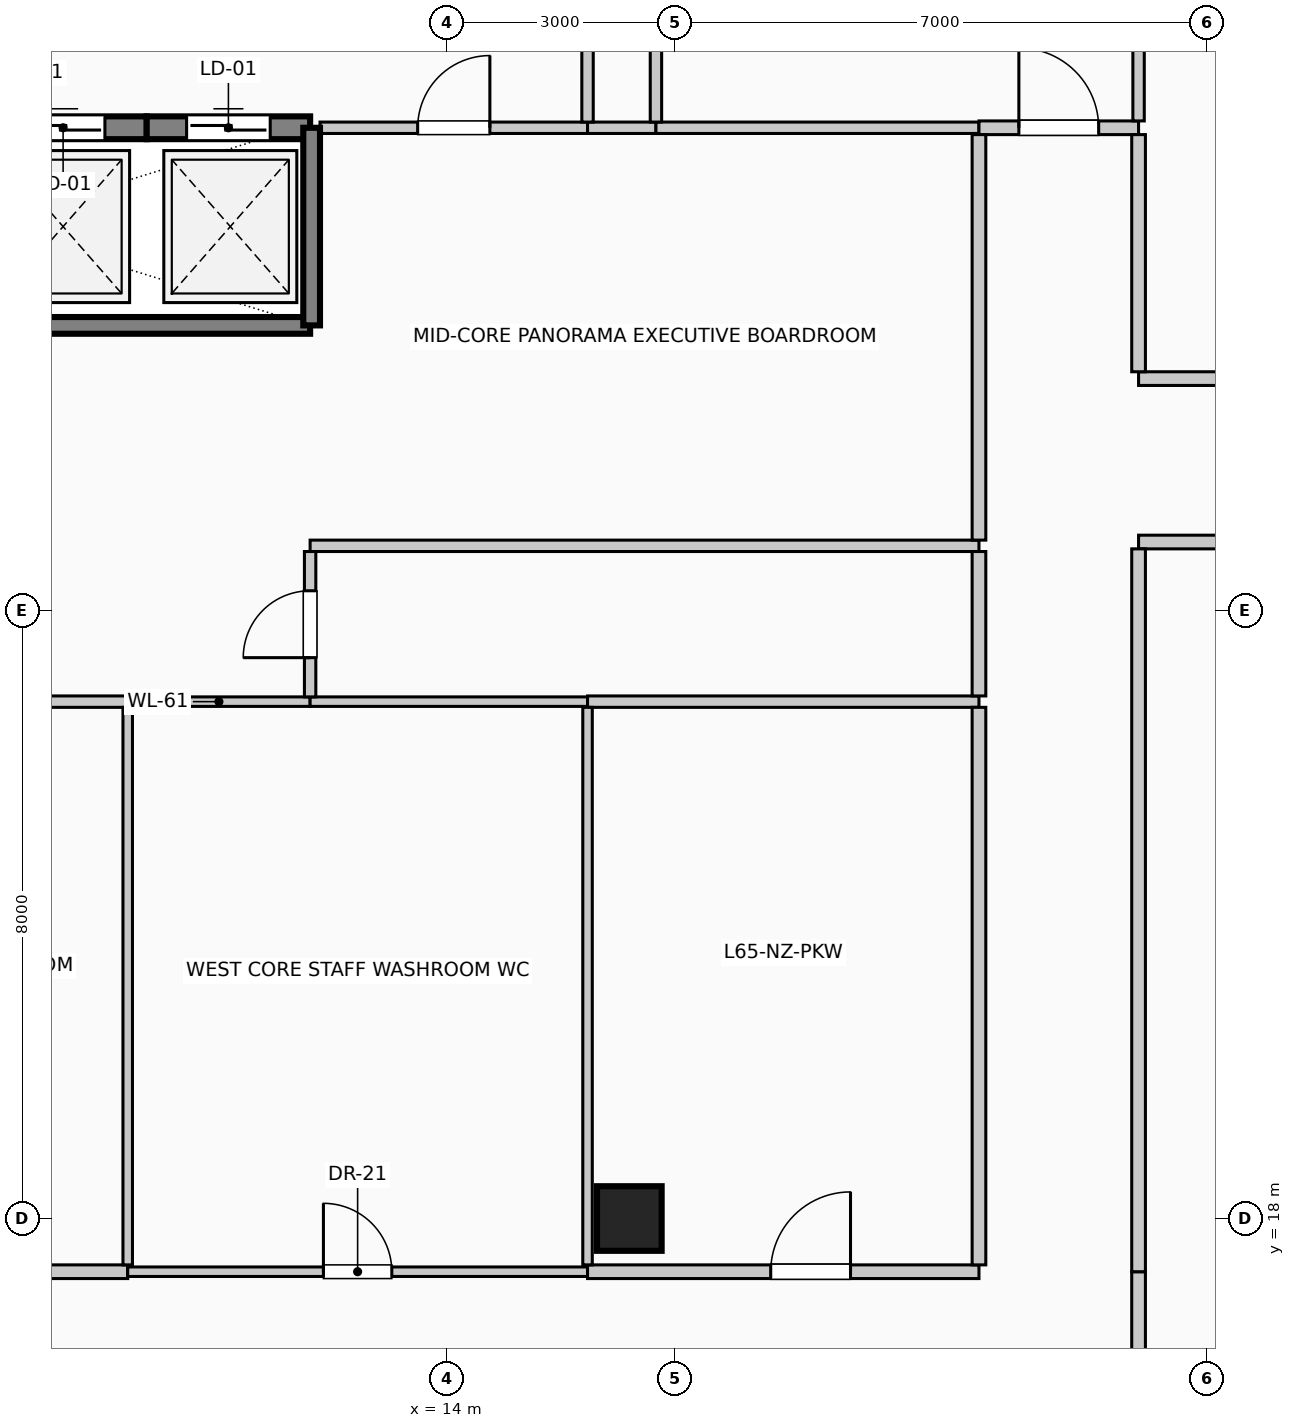
"""IFC4 building model, lengths in metres.
Left out: names, types, materials, properties, quantities, classifications, styles, units other than length and angle.
Written with IfcOpenShell. Run it as: python <this file> out.ifc"""

import sys

from ifc_helpers import new_model, si_unit, direction, frame, frame_2d, origin, origin_2d, place, context, subcontext, project, spatial, rectangle, circle, extrude, element, fill, save


model = new_model("IFC4")
c1 = context("Model", 3, precision=1e-05, world=origin(), true_north=direction((0.0, 1.0)))
c2 = subcontext(c1, "Body", "Model", "MODEL_VIEW")
j1 = project(units=[si_unit("LENGTHUNIT", "METRE"), si_unit("PLANEANGLEUNIT", "RADIAN")], contexts=[c1])
p1 = place(None, origin())
s1 = spatial("IfcSite", under=j1, at=p1, CompositionType="ELEMENT")
p2 = place(p1, origin())
s2 = spatial("IfcBuilding", under=s1, at=p2, CompositionType="ELEMENT")
p3 = place(p2, frame((0.0, 0.0, 268.6)))
s3 = spatial("IfcBuildingStorey", under=s2, at=p3, CompositionType="ELEMENT", Elevation=268.6)
p4 = place(p3, frame((16.4, 18.0, 0.0), z_axis=(0.0, 0.0, 1.0), x_axis=(1.0, 0.0, 0.0)))
e1 = element("IfcColumn", 1, at=p4, inside=s3, PredefinedType="COLUMN", context=c2, shape_type="SweptSolid", body=[
    extrude(circle(Radius=0.425, at=origin_2d()), origin(), (0.0, 0.0, 1.0), 4.0),
])
p5 = place(p3, frame((7.85, 32.35, 0.0), z_axis=(0.0, 0.0, 1.0), x_axis=(1.0, 0.0, 0.0)))
e2 = element("IfcWall", 2, at=p5, inside=s3, PredefinedType="SOLIDWALL", context=c2, shape_type="SweptSolid", body=[
    extrude(rectangle(XDim=2.2, YDim=0.3, at=frame_2d((1.1, 0.0))), origin(), (0.0, 0.0, 1.0), 4.0),
])
p6 = place(p5, frame((0.55, 0.0, 0.0)))
e3 = element("IfcOpeningElement", 3, at=p6, cuts=e2, PredefinedType="OPENING", context=c2, shape_type="SweptSolid", body=[
    extrude(rectangle(XDim=1.1, YDim=2.2, at=frame_2d((0.55, 1.1))), frame((0.0, 0.16, 0.0), z_axis=(0.0, -1.0, 0.0), x_axis=(1.0, 0.0, 0.0)), (0.0, 0.0, 1.0), 0.32),
])
p7 = place(p3, frame((10.05, 32.35, 0.0), z_axis=(0.0, 0.0, 1.0), x_axis=(1.0, 0.0, 0.0)))
e4 = element("IfcWall", 4, at=p7, inside=s3, PredefinedType="SOLIDWALL", context=c2, shape_type="SweptSolid", body=[
    extrude(rectangle(XDim=2.15, YDim=0.3, at=frame_2d((1.075, 0.0))), origin(), (0.0, 0.0, 1.0), 4.0),
])
p8 = place(p7, frame((0.525, 0.0, 0.0)))
e5 = element("IfcOpeningElement", 5, at=p8, cuts=e4, PredefinedType="OPENING", context=c2, shape_type="SweptSolid", body=[
    extrude(rectangle(XDim=1.1, YDim=2.2, at=frame_2d((0.55, 1.1))), frame((0.0, 0.16, 0.0), z_axis=(0.0, -1.0, 0.0), x_axis=(1.0, 0.0, 0.0)), (0.0, 0.0, 1.0), 0.32),
])
p9 = place(p3, frame((3.55, 29.75, 0.0), z_axis=(0.0, 0.0, 1.0), x_axis=(1.0, 0.0, 0.0)))
e6 = element("IfcWall", 6, at=p9, inside=s3, PredefinedType="SOLIDWALL", context=c2, shape_type="SweptSolid", body=[
    extrude(rectangle(XDim=8.65, YDim=0.22, at=frame_2d((4.325, 0.0))), origin(), (0.0, 0.0, 1.0), 4.0),
])
p10 = place(p3, frame((12.22, 29.75, 0.0), z_axis=(0.0, 0.0, 1.0), x_axis=(0.0, 1.0, 0.0)))
e7 = element("IfcWall", 7, at=p10, inside=s3, PredefinedType="SOLIDWALL", context=c2, shape_type="SweptSolid", body=[
    extrude(rectangle(XDim=2.6, YDim=0.22, at=frame_2d((1.3, 0.0))), origin(), (0.0, 0.0, 1.0), 4.0),
])
p11 = place(p3, frame((3.55, 17.3, 0.0), z_axis=(0.0, 0.0, 1.0), x_axis=(1.0, 0.0, 0.0)))
e8 = element("IfcWall", 8, at=p11, inside=s3, PredefinedType="PARTITIONING", context=c2, shape_type="SweptSolid", body=[
    extrude(rectangle(XDim=6.25, YDim=0.18, at=frame_2d((3.125, 0.0))), origin(), (0.0, 0.0, 1.0), 3.75),
])
p12 = place(p11, frame((2.6, 0.0, 0.0)))
e9 = element("IfcOpeningElement", 9, at=p12, cuts=e8, PredefinedType="OPENING", context=c2, shape_type="SweptSolid", body=[
    extrude(rectangle(XDim=1.05, YDim=2.15, at=frame_2d((0.525, 1.075))), frame((0.0, 0.1, 0.0), z_axis=(0.0, -1.0, 0.0), x_axis=(1.0, 0.0, 0.0)), (0.0, 0.0, 1.0), 0.2),
])
p13 = place(p3, frame((9.8, 17.3, 0.0), z_axis=(0.0, 0.0, 1.0), x_axis=(1.0, 0.0, 0.0)))
e10 = element("IfcWall", 10, at=p13, inside=s3, PredefinedType="PARTITIONING", context=c2, shape_type="SweptSolid", body=[
    extrude(rectangle(XDim=6.05, YDim=0.125, at=frame_2d((3.025, 0.0))), origin(), (0.0, 0.0, 1.0), 3.75),
])
p14 = place(p13, frame((2.575, 0.0, 0.0)))
e11 = element("IfcOpeningElement", 11, at=p14, cuts=e10, PredefinedType="OPENING", context=c2, shape_type="SweptSolid", body=[
    extrude(rectangle(XDim=0.9, YDim=2.1, at=frame_2d((0.45, 1.05))), frame((0.0, 0.073, 0.0), z_axis=(0.0, -1.0, 0.0), x_axis=(1.0, 0.0, 0.0)), (0.0, 0.0, 1.0), 0.145),
])
p15 = place(p3, frame((15.85, 17.3, 0.0), z_axis=(0.0, 0.0, 1.0), x_axis=(1.0, 0.0, 0.0)))
e12 = element("IfcWall", 12, at=p15, inside=s3, PredefinedType="PARTITIONING", context=c2, shape_type="SweptSolid", body=[
    extrude(rectangle(XDim=5.15, YDim=0.18, at=frame_2d((2.575, 0.0))), origin(), (0.0, 0.0, 1.0), 3.75),
])
p16 = place(p15, frame((2.41, 0.0, 0.0)))
e13 = element("IfcOpeningElement", 13, at=p16, cuts=e12, PredefinedType="OPENING", context=c2, shape_type="SweptSolid", body=[
    extrude(rectangle(XDim=1.05, YDim=2.15, at=frame_2d((0.525, 1.075))), frame((0.0, 0.1, 0.0), z_axis=(0.0, -1.0, 0.0), x_axis=(1.0, 0.0, 0.0)), (0.0, 0.0, 1.0), 0.2),
])
p17 = place(p3, frame((3.55, 24.8, 0.0), z_axis=(0.0, 0.0, 1.0), x_axis=(1.0, 0.0, 0.0)))
e14 = element("IfcWall", 14, at=p17, inside=s3, PredefinedType="PARTITIONING", context=c2, shape_type="SweptSolid", body=[
    extrude(rectangle(XDim=6.25, YDim=0.15, at=frame_2d((3.125, 0.0))), origin(), (0.0, 0.0, 1.0), 3.75),
])
p18 = place(p3, frame((9.8, 24.8, 0.0), z_axis=(0.0, 0.0, 1.0), x_axis=(1.0, 0.0, 0.0)))
e15 = element("IfcWall", 15, at=p18, inside=s3, PredefinedType="PARTITIONING", context=c2, shape_type="SweptSolid", body=[
    extrude(rectangle(XDim=2.4, YDim=0.125, at=frame_2d((1.2, 0.0))), origin(), (0.0, 0.0, 1.0), 3.75),
])
p19 = place(p3, frame((12.2, 24.8, 0.0), z_axis=(0.0, 0.0, 1.0), x_axis=(1.0, 0.0, 0.0)))
e16 = element("IfcWall", 16, at=p19, inside=s3, PredefinedType="PARTITIONING", context=c2, shape_type="SweptSolid", body=[
    extrude(rectangle(XDim=3.65, YDim=0.125, at=frame_2d((1.825, 0.0))), origin(), (0.0, 0.0, 1.0), 3.75),
])
p20 = place(p3, frame((15.85, 24.8, 0.0), z_axis=(0.0, 0.0, 1.0), x_axis=(1.0, 0.0, 0.0)))
e17 = element("IfcWall", 17, at=p20, inside=s3, PredefinedType="PARTITIONING", context=c2, shape_type="SweptSolid", body=[
    extrude(rectangle(XDim=5.15, YDim=0.15, at=frame_2d((2.575, 0.0))), origin(), (0.0, 0.0, 1.0), 3.75),
])
p21 = place(p3, frame((12.2, 26.85, 0.0), z_axis=(0.0, 0.0, 1.0), x_axis=(1.0, 0.0, 0.0)))
e18 = element("IfcWall", 18, at=p21, inside=s3, PredefinedType="PARTITIONING", context=c2, shape_type="SweptSolid", body=[
    extrude(rectangle(XDim=8.8, YDim=0.15, at=frame_2d((4.4, 0.0))), origin(), (0.0, 0.0, 1.0), 3.75),
])
p22 = place(p3, frame((23.1, 26.9, 0.0), z_axis=(0.0, 0.0, 1.0), x_axis=(1.0, 0.0, 0.0)))
e19 = element("IfcWall", 19, at=p22, inside=s3, PredefinedType="PARTITIONING", context=c2, shape_type="SweptSolid", body=[
    extrude(rectangle(XDim=4.12, YDim=0.18, at=frame_2d((2.06, 0.0))), origin(), (0.0, 0.0, 1.0), 3.75),
])
p23 = place(p22, frame((1.535, 0.0, 0.0)))
e20 = element("IfcOpeningElement", 20, at=p23, cuts=e19, PredefinedType="OPENING", context=c2, shape_type="SweptSolid", body=[
    extrude(rectangle(XDim=1.05, YDim=2.15, at=frame_2d((0.525, 1.075))), frame((0.0, 0.1, 0.0), z_axis=(0.0, -1.0, 0.0), x_axis=(1.0, 0.0, 0.0)), (0.0, 0.0, 1.0), 0.2),
])
p24 = place(p3, frame((23.1, 29.05, 0.0), z_axis=(0.0, 0.0, 1.0), x_axis=(1.0, 0.0, 0.0)))
e21 = element("IfcWall", 21, at=p24, inside=s3, PredefinedType="PARTITIONING", context=c2, shape_type="SweptSolid", body=[
    extrude(rectangle(XDim=7.13, YDim=0.18, at=frame_2d((3.565, 0.0))), origin(), (0.0, 0.0, 1.0), 3.75),
])
p25 = place(p24, frame((3.09, 0.0, 0.0)))
e22 = element("IfcOpeningElement", 22, at=p25, cuts=e21, PredefinedType="OPENING", context=c2, shape_type="SweptSolid", body=[
    extrude(rectangle(XDim=0.95, YDim=2.15, at=frame_2d((0.475, 1.075))), frame((0.0, 0.1, 0.0), z_axis=(0.0, -1.0, 0.0), x_axis=(1.0, 0.0, 0.0)), (0.0, 0.0, 1.0), 0.2),
])
p26 = place(p3, frame((12.33, 32.35, 0.0), z_axis=(0.0, 0.0, 1.0), x_axis=(1.0, 0.0, 0.0)))
e23 = element("IfcWall", 23, at=p26, inside=s3, PredefinedType="PARTITIONING", context=c2, shape_type="SweptSolid", body=[
    extrude(rectangle(XDim=3.52, YDim=0.15, at=frame_2d((1.76, 0.0))), origin(), (0.0, 0.0, 1.0), 3.75),
])
p27 = place(p26, frame((1.285, 0.0, 0.0)))
e24 = element("IfcOpeningElement", 24, at=p27, cuts=e23, PredefinedType="OPENING", context=c2, shape_type="SweptSolid", body=[
    extrude(rectangle(XDim=0.95, YDim=2.15, at=frame_2d((0.475, 1.075))), frame((0.0, 0.085, 0.0), z_axis=(0.0, -1.0, 0.0), x_axis=(1.0, 0.0, 0.0)), (0.0, 0.0, 1.0), 0.17),
])
p28 = place(p3, frame((15.85, 32.35, 0.0), z_axis=(0.0, 0.0, 1.0), x_axis=(1.0, 0.0, 0.0)))
e25 = element("IfcWall", 25, at=p28, inside=s3, PredefinedType="PARTITIONING", context=c2, shape_type="SweptSolid", body=[
    extrude(rectangle(XDim=0.9, YDim=0.15, at=frame_2d((0.45, 0.0))), origin(), (0.0, 0.0, 1.0), 3.75),
])
p29 = place(p3, frame((16.75, 32.35, 0.0), z_axis=(0.0, 0.0, 1.0), x_axis=(1.0, 0.0, 0.0)))
e26 = element("IfcWall", 26, at=p29, inside=s3, PredefinedType="PARTITIONING", context=c2, shape_type="SweptSolid", body=[
    extrude(rectangle(XDim=4.25, YDim=0.15, at=frame_2d((2.125, 0.0))), origin(), (0.0, 0.0, 1.0), 3.75),
])
p30 = place(p3, frame((21.0, 32.35, 0.0), z_axis=(0.0, 0.0, 1.0), x_axis=(1.0, 0.0, 0.0)))
e27 = element("IfcWall", 27, at=p30, inside=s3, PredefinedType="PARTITIONING", context=c2, shape_type="SweptSolid", body=[
    extrude(rectangle(XDim=2.1, YDim=0.18, at=frame_2d((1.05, 0.0))), origin(), (0.0, 0.0, 1.0), 3.75),
])
p31 = place(p30, frame((0.525, 0.0, 0.0)))
e28 = element("IfcOpeningElement", 28, at=p31, cuts=e27, PredefinedType="OPENING", context=c2, shape_type="SweptSolid", body=[
    extrude(rectangle(XDim=1.05, YDim=2.15, at=frame_2d((0.525, 1.075))), frame((0.0, 0.1, 0.0), z_axis=(0.0, -1.0, 0.0), x_axis=(1.0, 0.0, 0.0)), (0.0, 0.0, 1.0), 0.2),
])
p32 = place(p3, frame((9.8, 17.39, 0.0), z_axis=(0.0, 0.0, 1.0), x_axis=(0.0, 1.0, 0.0)))
e29 = element("IfcWall", 29, at=p32, inside=s3, PredefinedType="PARTITIONING", context=c2, shape_type="SweptSolid", body=[
    extrude(rectangle(XDim=7.335, YDim=0.125, at=frame_2d((3.667, 0.0))), origin(), (0.0, 0.0, 1.0), 3.75),
])
p33 = place(p3, frame((12.2, 24.863, 0.0), z_axis=(0.0, 0.0, 1.0), x_axis=(0.0, 1.0, 0.0)))
e30 = element("IfcWall", 30, at=p33, inside=s3, PredefinedType="PARTITIONING", context=c2, shape_type="SweptSolid", body=[
    extrude(rectangle(XDim=1.912, YDim=0.15, at=frame_2d((0.956, 0.0))), origin(), (0.0, 0.0, 1.0), 3.75),
])
p34 = place(p33, frame((0.516, 0.0, 0.0)))
e31 = element("IfcOpeningElement", 31, at=p34, cuts=e30, PredefinedType="OPENING", context=c2, shape_type="SweptSolid", body=[
    extrude(rectangle(XDim=0.88, YDim=2.1, at=frame_2d((0.44, 1.05))), frame((0.0, 0.085, 0.0), z_axis=(0.0, -1.0, 0.0), x_axis=(1.0, 0.0, 0.0)), (0.0, 0.0, 1.0), 0.17),
])
p35 = place(p3, frame((15.85, 17.39, 0.0), z_axis=(0.0, 0.0, 1.0), x_axis=(0.0, 1.0, 0.0)))
e32 = element("IfcWall", 32, at=p35, inside=s3, PredefinedType="PARTITIONING", context=c2, shape_type="SweptSolid", body=[
    extrude(rectangle(XDim=7.335, YDim=0.125, at=frame_2d((3.667, 0.0))), origin(), (0.0, 0.0, 1.0), 3.75),
])
p36 = place(p3, frame((15.85, 32.425, 0.0), z_axis=(0.0, 0.0, 1.0), x_axis=(0.0, 1.0, 0.0)))
e33 = element("IfcWall", 33, at=p36, inside=s3, PredefinedType="PARTITIONING", context=c2, shape_type="SweptSolid", body=[
    extrude(rectangle(XDim=1.725, YDim=0.15, at=frame_2d((0.862, 0.0))), origin(), (0.0, 0.0, 1.0), 3.75),
])
p37 = place(p3, frame((16.75, 32.425, 0.0), z_axis=(0.0, 0.0, 1.0), x_axis=(0.0, 1.0, 0.0)))
e34 = element("IfcWall", 34, at=p37, inside=s3, PredefinedType="PARTITIONING", context=c2, shape_type="SweptSolid", body=[
    extrude(rectangle(XDim=1.15, YDim=0.15, at=frame_2d((0.575, 0.0))), origin(), (0.0, 0.0, 1.0), 3.75),
])
p38 = place(p3, frame((21.0, 17.39, 0.0), z_axis=(0.0, 0.0, 1.0), x_axis=(0.0, 1.0, 0.0)))
e35 = element("IfcWall", 35, at=p38, inside=s3, PredefinedType="PARTITIONING", context=c2, shape_type="SweptSolid", body=[
    extrude(rectangle(XDim=7.335, YDim=0.18, at=frame_2d((3.667, 0.0))), origin(), (0.0, 0.0, 1.0), 3.75),
])
p39 = place(p3, frame((21.0, 24.875, 0.0), z_axis=(0.0, 0.0, 1.0), x_axis=(0.0, 1.0, 0.0)))
e36 = element("IfcWall", 36, at=p39, inside=s3, PredefinedType="PARTITIONING", context=c2, shape_type="SweptSolid", body=[
    extrude(rectangle(XDim=1.9, YDim=0.18, at=frame_2d((0.95, 0.0))), origin(), (0.0, 0.0, 1.0), 3.75),
])
p40 = place(p3, frame((21.0, 26.925, 0.0), z_axis=(0.0, 0.0, 1.0), x_axis=(0.0, 1.0, 0.0)))
e37 = element("IfcWall", 37, at=p40, inside=s3, PredefinedType="PARTITIONING", context=c2, shape_type="SweptSolid", body=[
    extrude(rectangle(XDim=5.335, YDim=0.18, at=frame_2d((2.667, 0.0))), origin(), (0.0, 0.0, 1.0), 3.75),
])
p41 = place(p3, frame((23.1, 15.29, 0.0), z_axis=(0.0, 0.0, 1.0), x_axis=(0.0, 1.0, 0.0)))
e38 = element("IfcWall", 38, at=p41, inside=s3, PredefinedType="PARTITIONING", context=c2, shape_type="SweptSolid", body=[
    extrude(rectangle(XDim=2.01, YDim=0.18, at=frame_2d((1.005, 0.0))), origin(), (0.0, 0.0, 1.0), 3.75),
])
p42 = place(p3, frame((23.1, 17.3, 0.0), z_axis=(0.0, 0.0, 1.0), x_axis=(0.0, 1.0, 0.0)))
e39 = element("IfcWall", 39, at=p42, inside=s3, PredefinedType="PARTITIONING", context=c2, shape_type="SweptSolid", body=[
    extrude(rectangle(XDim=9.51, YDim=0.18, at=frame_2d((4.755, 0.0))), origin(), (0.0, 0.0, 1.0), 3.75),
])
p43 = place(p3, frame((23.1, 29.14, 0.0), z_axis=(0.0, 0.0, 1.0), x_axis=(0.0, 1.0, 0.0)))
e40 = element("IfcWall", 40, at=p43, inside=s3, PredefinedType="PARTITIONING", context=c2, shape_type="SweptSolid", body=[
    extrude(rectangle(XDim=3.12, YDim=0.18, at=frame_2d((1.56, 0.0))), origin(), (0.0, 0.0, 1.0), 3.75),
])
p44 = place(p3, frame((23.1, 32.44, 0.0), z_axis=(0.0, 0.0, 1.0), x_axis=(0.0, 1.0, 0.0)))
e41 = element("IfcWall", 41, at=p44, inside=s3, PredefinedType="PARTITIONING", context=c2, shape_type="SweptSolid", body=[
    extrude(rectangle(XDim=12.84, YDim=0.15, at=frame_2d((6.42, 0.0))), origin(), (0.0, 0.0, 1.0), 3.75),
])
p45 = place(p6, origin())
e42 = element("IfcDoor", 42, at=p45, inside=s3, OperationType="SLIDING_TO_LEFT", PredefinedType="DOOR", context=c2, shape_type="SweptSolid", body=[
    extrude(rectangle(XDim=1.1, YDim=2.2, at=frame_2d((0.55, 1.1))), frame((0.0, 0.025, 0.0), z_axis=(0.0, -1.0, 0.0), x_axis=(1.0, 0.0, 0.0)), (0.0, 0.0, 1.0), 0.05),
])
fill(e3, e42)
p46 = place(p8, origin())
e43 = element("IfcDoor", 43, at=p46, inside=s3, OperationType="SLIDING_TO_RIGHT", PredefinedType="DOOR", context=c2, shape_type="SweptSolid", body=[
    extrude(rectangle(XDim=1.1, YDim=2.2, at=frame_2d((0.55, 1.1))), frame((0.0, 0.025, 0.0), z_axis=(0.0, -1.0, 0.0), x_axis=(1.0, 0.0, 0.0)), (0.0, 0.0, 1.0), 0.05),
])
fill(e5, e43)
p47 = place(p14, origin())
e44 = element("IfcDoor", 44, at=p47, inside=s3, OperationType="SINGLE_SWING_LEFT", PredefinedType="DOOR", context=c2, shape_type="SweptSolid", body=[
    extrude(rectangle(XDim=0.9, YDim=2.1, at=frame_2d((0.45, 1.05))), frame((0.0, 0.025, 0.0), z_axis=(0.0, -1.0, 0.0), x_axis=(1.0, 0.0, 0.0)), (0.0, 0.0, 1.0), 0.05),
])
fill(e11, e44)
p48 = place(p16, origin())
e45 = element("IfcDoor", 45, at=p48, inside=s3, OperationType="SINGLE_SWING_RIGHT", PredefinedType="DOOR", context=c2, shape_type="SweptSolid", body=[
    extrude(rectangle(XDim=1.05, YDim=2.15, at=frame_2d((0.525, 1.075))), frame((0.0, 0.025, 0.0), z_axis=(0.0, -1.0, 0.0), x_axis=(1.0, 0.0, 0.0)), (0.0, 0.0, 1.0), 0.05),
])
fill(e13, e45)
p49 = place(p27, origin())
e46 = element("IfcDoor", 46, at=p49, inside=s3, OperationType="SINGLE_SWING_RIGHT", PredefinedType="DOOR", context=c2, shape_type="SweptSolid", body=[
    extrude(rectangle(XDim=0.95, YDim=2.15, at=frame_2d((0.475, 1.075))), frame((0.0, 0.025, 0.0), z_axis=(0.0, -1.0, 0.0), x_axis=(1.0, 0.0, 0.0)), (0.0, 0.0, 1.0), 0.05),
])
fill(e24, e46)
p50 = place(p31, origin())
e47 = element("IfcDoor", 47, at=p50, inside=s3, OperationType="SINGLE_SWING_LEFT", PredefinedType="DOOR", context=c2, shape_type="SweptSolid", body=[
    extrude(rectangle(XDim=1.05, YDim=2.15, at=frame_2d((0.525, 1.075))), frame((0.0, 0.025, 0.0), z_axis=(0.0, -1.0, 0.0), x_axis=(1.0, 0.0, 0.0)), (0.0, 0.0, 1.0), 0.05),
])
fill(e28, e47)
p51 = place(p34, origin())
e48 = element("IfcDoor", 48, at=p51, inside=s3, OperationType="SINGLE_SWING_LEFT", PredefinedType="DOOR", context=c2, shape_type="SweptSolid", body=[
    extrude(rectangle(XDim=0.88, YDim=2.1, at=frame_2d((0.44, 1.05))), frame((0.0, 0.025, 0.0), z_axis=(0.0, -1.0, 0.0), x_axis=(1.0, 0.0, 0.0)), (0.0, 0.0, 1.0), 0.05),
])
fill(e31, e48)
save(model, sys.argv[1])
